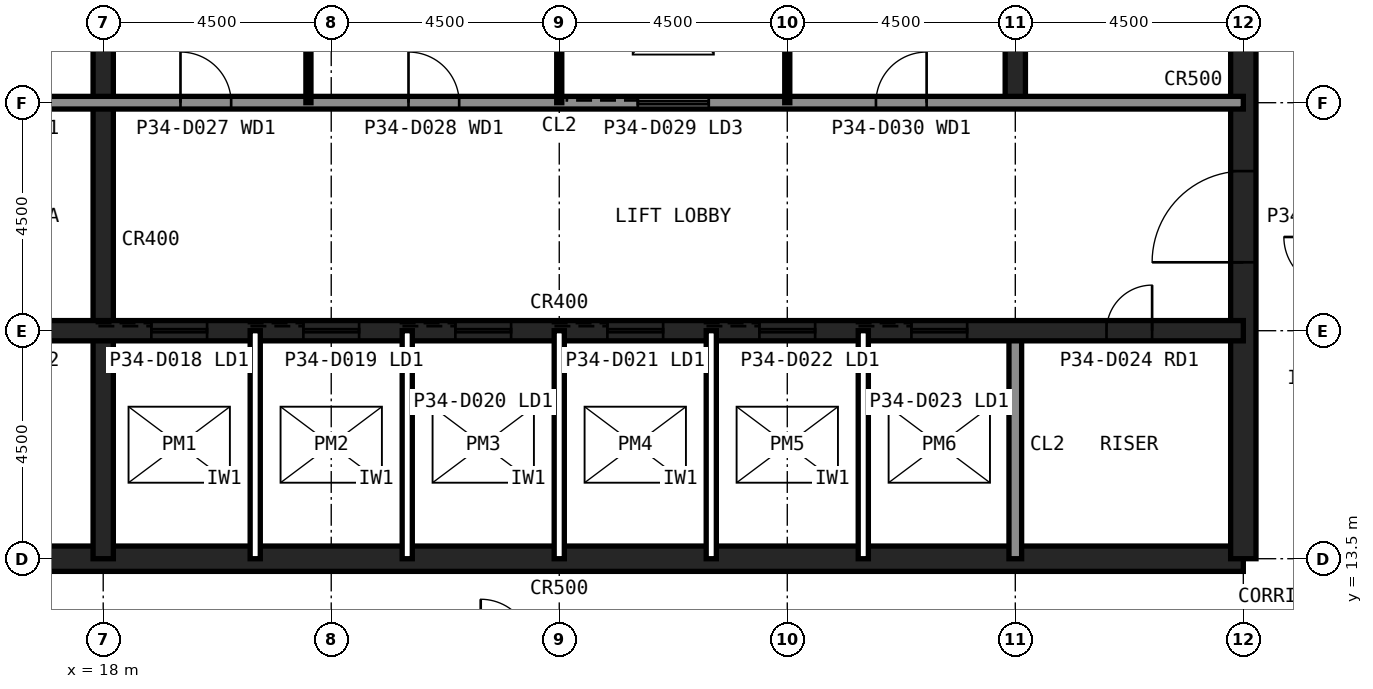
"""IFC4 building model, lengths in metres.
Left out: names, types, materials, properties, quantities, classifications, styles, units other than length and angle.
Written with IfcOpenShell. Run it as: python <this file> out.ifc"""

import sys

from ifc_helpers import new_model, si_unit, direction, frame, frame_2d, origin, place, context, subcontext, project, spatial, rectangle, extrude, element, fill, save


model = new_model("IFC4")
c1 = context("Model", 3, precision=1e-05, world=origin(), true_north=direction((0.0, 1.0)))
c2 = subcontext(c1, "Body", "Model", "MODEL_VIEW")
j1 = project(units=[si_unit("LENGTHUNIT", "METRE"), si_unit("PLANEANGLEUNIT", "RADIAN")], contexts=[c1])
p1 = place(None, origin())
s1 = spatial("IfcSite", under=j1, at=p1, CompositionType="ELEMENT")
p2 = place(p1, origin())
s2 = spatial("IfcBuilding", under=s1, at=p2, CompositionType="ELEMENT")
p3 = place(p2, frame((0.0, 0.0, 143.6)))
s3 = spatial("IfcBuildingStorey", under=s2, at=p3, CompositionType="ELEMENT", Elevation=143.6)
p4 = place(p3, frame((13.5, 13.5, 0.0), z_axis=(0.0, 0.0, 1.0), x_axis=(1.0, 0.0, 0.0)))
e1 = element("IfcWall", 1, at=p4, inside=s3, PredefinedType="SHEAR", context=c2, shape_type="SweptSolid", body=[
    extrude(rectangle(XDim=27.0, YDim=0.5, at=frame_2d((13.5, 0.0))), origin(), (0.0, 0.0, 1.0), 4.0),
])
p5 = place(p3, frame((40.5, 13.5, 0.0), z_axis=(0.0, 0.0, 1.0), x_axis=(0.0, 1.0, 0.0)))
e2 = element("IfcWall", 2, at=p5, inside=s3, PredefinedType="SHEAR", context=c2, shape_type="SweptSolid", body=[
    extrude(rectangle(XDim=27.0, YDim=0.5, at=frame_2d((13.5, 0.0))), origin(), (0.0, 0.0, 1.0), 4.0),
])
p6 = place(p5, frame((5.85, 0.0, 0.0)))
e3 = element("IfcOpeningElement", 3, at=p6, cuts=e2, PredefinedType="OPENING", context=c2, shape_type="SweptSolid", body=[
    extrude(rectangle(XDim=1.8, YDim=2.1, at=frame_2d((0.9, 1.05))), frame((0.0, 0.26, 0.0), z_axis=(0.0, -1.0, 0.0), x_axis=(1.0, 0.0, 0.0)), (0.0, 0.0, 1.0), 0.52),
])
p7 = place(p5, frame((19.65, 0.0, 0.0)))
e4 = element("IfcOpeningElement", 4, at=p7, cuts=e2, PredefinedType="OPENING", context=c2, shape_type="SweptSolid", body=[
    extrude(rectangle(XDim=1.2, YDim=2.1, at=frame_2d((0.6, 1.05))), frame((0.0, 0.26, 0.0), z_axis=(0.0, -1.0, 0.0), x_axis=(1.0, 0.0, 0.0)), (0.0, 0.0, 1.0), 0.52),
])
p8 = place(p3, frame((18.0, 13.5, 0.0), z_axis=(0.0, 0.0, 1.0), x_axis=(0.0, 1.0, 0.0)))
e5 = element("IfcWall", 5, at=p8, inside=s3, PredefinedType="SHEAR", context=c2, shape_type="SweptSolid", body=[
    extrude(rectangle(XDim=18.0, YDim=0.4, at=frame_2d((9.0, 0.0))), origin(), (0.0, 0.0, 1.0), 4.0),
])
p9 = place(p3, frame((36.0, 13.5, 0.0), z_axis=(0.0, 0.0, 1.0), x_axis=(0.0, 1.0, 0.0)))
e6 = element("IfcWall", 6, at=p9, inside=s3, PredefinedType="SOLIDWALL", context=c2, shape_type="SweptSolid", body=[
    extrude(rectangle(XDim=4.5, YDim=0.25, at=frame_2d((2.25, 0.0))), origin(), (0.0, 0.0, 1.0), 3.84),
])
p10 = place(p3, frame((36.0, 22.5, 0.0), z_axis=(0.0, 0.0, 1.0), x_axis=(0.0, 1.0, 0.0)))
e7 = element("IfcWall", 7, at=p10, inside=s3, PredefinedType="SHEAR", context=c2, shape_type="SweptSolid", body=[
    extrude(rectangle(XDim=18.0, YDim=0.4, at=frame_2d((9.0, 0.0))), origin(), (0.0, 0.0, 1.0), 4.0),
])
p11 = place(p3, frame((13.5, 18.0, 0.0), z_axis=(0.0, 0.0, 1.0), x_axis=(1.0, 0.0, 0.0)))
e8 = element("IfcWall", 8, at=p11, inside=s3, PredefinedType="SHEAR", context=c2, shape_type="SweptSolid", body=[
    extrude(rectangle(XDim=27.0, YDim=0.4, at=frame_2d((13.5, 0.0))), origin(), (0.0, 0.0, 1.0), 4.0),
])
p12 = place(p11, frame((24.3, 0.0, 0.0)))
e9 = element("IfcOpeningElement", 9, at=p12, cuts=e8, PredefinedType="OPENING", context=c2, shape_type="SweptSolid", body=[
    extrude(rectangle(XDim=0.9, YDim=2.1, at=frame_2d((0.45, 1.05))), frame((0.0, 0.21, 0.0), z_axis=(0.0, -1.0, 0.0), x_axis=(1.0, 0.0, 0.0)), (0.0, 0.0, 1.0), 0.42),
])
p13 = place(p11, frame((5.45, 0.0, 0.0)))
e10 = element("IfcOpeningElement", 10, at=p13, cuts=e8, PredefinedType="OPENING", context=c2, shape_type="SweptSolid", body=[
    extrude(rectangle(XDim=1.1, YDim=2.1, at=frame_2d((0.55, 1.05))), frame((0.0, 0.21, 0.0), z_axis=(0.0, -1.0, 0.0), x_axis=(1.0, 0.0, 0.0)), (0.0, 0.0, 1.0), 0.42),
])
p14 = place(p11, frame((8.45, 0.0, 0.0)))
e11 = element("IfcOpeningElement", 11, at=p14, cuts=e8, PredefinedType="OPENING", context=c2, shape_type="SweptSolid", body=[
    extrude(rectangle(XDim=1.1, YDim=2.1, at=frame_2d((0.55, 1.05))), frame((0.0, 0.21, 0.0), z_axis=(0.0, -1.0, 0.0), x_axis=(1.0, 0.0, 0.0)), (0.0, 0.0, 1.0), 0.42),
])
p15 = place(p11, frame((11.45, 0.0, 0.0)))
e12 = element("IfcOpeningElement", 12, at=p15, cuts=e8, PredefinedType="OPENING", context=c2, shape_type="SweptSolid", body=[
    extrude(rectangle(XDim=1.1, YDim=2.1, at=frame_2d((0.55, 1.05))), frame((0.0, 0.21, 0.0), z_axis=(0.0, -1.0, 0.0), x_axis=(1.0, 0.0, 0.0)), (0.0, 0.0, 1.0), 0.42),
])
p16 = place(p11, frame((14.45, 0.0, 0.0)))
e13 = element("IfcOpeningElement", 13, at=p16, cuts=e8, PredefinedType="OPENING", context=c2, shape_type="SweptSolid", body=[
    extrude(rectangle(XDim=1.1, YDim=2.1, at=frame_2d((0.55, 1.05))), frame((0.0, 0.21, 0.0), z_axis=(0.0, -1.0, 0.0), x_axis=(1.0, 0.0, 0.0)), (0.0, 0.0, 1.0), 0.42),
])
p17 = place(p11, frame((17.45, 0.0, 0.0)))
e14 = element("IfcOpeningElement", 14, at=p17, cuts=e8, PredefinedType="OPENING", context=c2, shape_type="SweptSolid", body=[
    extrude(rectangle(XDim=1.1, YDim=2.1, at=frame_2d((0.55, 1.05))), frame((0.0, 0.21, 0.0), z_axis=(0.0, -1.0, 0.0), x_axis=(1.0, 0.0, 0.0)), (0.0, 0.0, 1.0), 0.42),
])
p18 = place(p11, frame((20.45, 0.0, 0.0)))
e15 = element("IfcOpeningElement", 15, at=p18, cuts=e8, PredefinedType="OPENING", context=c2, shape_type="SweptSolid", body=[
    extrude(rectangle(XDim=1.1, YDim=2.1, at=frame_2d((0.55, 1.05))), frame((0.0, 0.21, 0.0), z_axis=(0.0, -1.0, 0.0), x_axis=(1.0, 0.0, 0.0)), (0.0, 0.0, 1.0), 0.42),
])
p19 = place(p11, frame((1.6, 0.0, 0.0)))
e16 = element("IfcOpeningElement", 16, at=p19, cuts=e8, PredefinedType="OPENING", context=c2, shape_type="SweptSolid", body=[
    extrude(rectangle(XDim=1.3, YDim=2.2, at=frame_2d((0.65, 1.1))), frame((0.0, 0.21, 0.0), z_axis=(0.0, -1.0, 0.0), x_axis=(1.0, 0.0, 0.0)), (0.0, 0.0, 1.0), 0.42),
])
p20 = place(p3, frame((13.5, 22.5, 0.0), z_axis=(0.0, 0.0, 1.0), x_axis=(1.0, 0.0, 0.0)))
e17 = element("IfcWall", 17, at=p20, inside=s3, PredefinedType="SOLIDWALL", context=c2, shape_type="SweptSolid", body=[
    extrude(rectangle(XDim=27.0, YDim=0.25, at=frame_2d((13.5, 0.0))), origin(), (0.0, 0.0, 1.0), 3.84),
])
p21 = place(p20, frame((1.65, 0.0, 0.0)))
e18 = element("IfcOpeningElement", 18, at=p21, cuts=e17, PredefinedType="OPENING", context=c2, shape_type="SweptSolid", body=[
    extrude(rectangle(XDim=1.2, YDim=2.1, at=frame_2d((0.6, 1.05))), frame((0.0, 0.135, 0.0), z_axis=(0.0, -1.0, 0.0), x_axis=(1.0, 0.0, 0.0)), (0.0, 0.0, 1.0), 0.27),
])
p22 = place(p20, frame((6.025, 0.0, 0.0)))
e19 = element("IfcOpeningElement", 19, at=p22, cuts=e17, PredefinedType="OPENING", context=c2, shape_type="SweptSolid", body=[
    extrude(rectangle(XDim=1.0, YDim=2.1, at=frame_2d((0.5, 1.05))), frame((0.0, 0.135, 0.0), z_axis=(0.0, -1.0, 0.0), x_axis=(1.0, 0.0, 0.0)), (0.0, 0.0, 1.0), 0.27),
])
p23 = place(p20, frame((10.525, 0.0, 0.0)))
e20 = element("IfcOpeningElement", 20, at=p23, cuts=e17, PredefinedType="OPENING", context=c2, shape_type="SweptSolid", body=[
    extrude(rectangle(XDim=1.0, YDim=2.1, at=frame_2d((0.5, 1.05))), frame((0.0, 0.135, 0.0), z_axis=(0.0, -1.0, 0.0), x_axis=(1.0, 0.0, 0.0)), (0.0, 0.0, 1.0), 0.27),
])
p24 = place(p20, frame((19.75, 0.0, 0.0)))
e21 = element("IfcOpeningElement", 21, at=p24, cuts=e17, PredefinedType="OPENING", context=c2, shape_type="SweptSolid", body=[
    extrude(rectangle(XDim=1.0, YDim=2.1, at=frame_2d((0.5, 1.05))), frame((0.0, 0.135, 0.0), z_axis=(0.0, -1.0, 0.0), x_axis=(1.0, 0.0, 0.0)), (0.0, 0.0, 1.0), 0.27),
])
p25 = place(p20, frame((15.05, 0.0, 0.0)))
e22 = element("IfcOpeningElement", 22, at=p25, cuts=e17, PredefinedType="OPENING", context=c2, shape_type="SweptSolid", body=[
    extrude(rectangle(XDim=1.4, YDim=2.4, at=frame_2d((0.7, 1.2))), frame((0.0, 0.135, 0.0), z_axis=(0.0, -1.0, 0.0), x_axis=(1.0, 0.0, 0.0)), (0.0, 0.0, 1.0), 0.27),
])
for number, where, z_axis, x_axis in (
    (23, (21.0, 13.5, 0.0), (0.0, 0.0, 1.0), (0.0, 1.0, 0.0)),
    (24, (24.0, 13.5, 0.0), (0.0, 0.0, 1.0), (0.0, 1.0, 0.0)),
    (25, (27.0, 13.5, 0.0), (0.0, 0.0, 1.0), (0.0, 1.0, 0.0)),
    (26, (30.0, 13.5, 0.0), (0.0, 0.0, 1.0), (0.0, 1.0, 0.0)),
    (27, (33.0, 13.5, 0.0), (0.0, 0.0, 1.0), (0.0, 1.0, 0.0)),
):
    element("IfcWall", number, at=place(p3, frame(where, z_axis=z_axis, x_axis=x_axis)), inside=s3, PredefinedType="PARTITIONING", context=c2, shape_type="SweptSolid", body=[
        extrude(rectangle(XDim=4.5, YDim=0.2, at=frame_2d((2.25, 0.0))), origin(), (0.0, 0.0, 1.0), 3.84),
    ])
for number, where, z_axis, x_axis in (
    (28, (22.05, 22.5, 0.0), (0.0, 0.0, 1.0), (0.0, 1.0, 0.0)),
    (29, (27.0, 22.5, 0.0), (0.0, 0.0, 1.0), (0.0, 1.0, 0.0)),
    (30, (31.5, 22.5, 0.0), (0.0, 0.0, 1.0), (0.0, 1.0, 0.0)),
):
    element("IfcWall", number, at=place(p3, frame(where, z_axis=z_axis, x_axis=x_axis)), inside=s3, PredefinedType="PLUMBINGWALL", context=c2, shape_type="SweptSolid", body=[
        extrude(rectangle(XDim=9.0, YDim=0.1, at=frame_2d((4.5, 0.0))), origin(), (0.0, 0.0, 1.0), 3.84),
    ])
p26 = place(p6, origin())
e31 = element("IfcDoor", 31, at=p26, inside=s3, OperationType="SINGLE_SWING_LEFT", PredefinedType="DOOR", context=c2, shape_type="SweptSolid", body=[
    extrude(rectangle(XDim=1.8, YDim=2.1, at=frame_2d((0.9, 1.05))), frame((0.0, 0.025, 0.0), z_axis=(0.0, -1.0, 0.0), x_axis=(1.0, 0.0, 0.0)), (0.0, 0.0, 1.0), 0.05),
])
fill(e3, e31)
p27 = place(p22, origin())
e32 = element("IfcDoor", 32, at=p27, inside=s3, OperationType="SINGLE_SWING_LEFT", PredefinedType="DOOR", context=c2, shape_type="SweptSolid", body=[
    extrude(rectangle(XDim=1.0, YDim=2.1, at=frame_2d((0.5, 1.05))), frame((0.0, 0.025, 0.0), z_axis=(0.0, -1.0, 0.0), x_axis=(1.0, 0.0, 0.0)), (0.0, 0.0, 1.0), 0.05),
])
fill(e19, e32)
p28 = place(p23, origin())
e33 = element("IfcDoor", 33, at=p28, inside=s3, OperationType="SINGLE_SWING_LEFT", PredefinedType="DOOR", context=c2, shape_type="SweptSolid", body=[
    extrude(rectangle(XDim=1.0, YDim=2.1, at=frame_2d((0.5, 1.05))), frame((0.0, 0.025, 0.0), z_axis=(0.0, -1.0, 0.0), x_axis=(1.0, 0.0, 0.0)), (0.0, 0.0, 1.0), 0.05),
])
fill(e20, e33)
p29 = place(p24, origin())
e34 = element("IfcDoor", 34, at=p29, inside=s3, OperationType="SINGLE_SWING_RIGHT", PredefinedType="DOOR", context=c2, shape_type="SweptSolid", body=[
    extrude(rectangle(XDim=1.0, YDim=2.1, at=frame_2d((0.5, 1.05))), frame((0.0, 0.025, 0.0), z_axis=(0.0, -1.0, 0.0), x_axis=(1.0, 0.0, 0.0)), (0.0, 0.0, 1.0), 0.05),
])
fill(e21, e34)
p30 = place(p12, origin())
e35 = element("IfcDoor", 35, at=p30, inside=s3, OperationType="SINGLE_SWING_RIGHT", PredefinedType="DOOR", context=c2, shape_type="SweptSolid", body=[
    extrude(rectangle(XDim=0.9, YDim=2.1, at=frame_2d((0.45, 1.05))), frame((0.0, 0.025, 0.0), z_axis=(0.0, -1.0, 0.0), x_axis=(1.0, 0.0, 0.0)), (0.0, 0.0, 1.0), 0.05),
])
fill(e9, e35)
p31 = place(p13, origin())
e36 = element("IfcDoor", 36, at=p31, inside=s3, OperationType="SLIDING_TO_LEFT", PredefinedType="DOOR", context=c2, shape_type="SweptSolid", body=[
    extrude(rectangle(XDim=1.1, YDim=2.1, at=frame_2d((0.55, 1.05))), frame((0.0, 0.025, 0.0), z_axis=(0.0, -1.0, 0.0), x_axis=(1.0, 0.0, 0.0)), (0.0, 0.0, 1.0), 0.05),
])
fill(e10, e36)
p32 = place(p14, origin())
e37 = element("IfcDoor", 37, at=p32, inside=s3, OperationType="SLIDING_TO_LEFT", PredefinedType="DOOR", context=c2, shape_type="SweptSolid", body=[
    extrude(rectangle(XDim=1.1, YDim=2.1, at=frame_2d((0.55, 1.05))), frame((0.0, 0.025, 0.0), z_axis=(0.0, -1.0, 0.0), x_axis=(1.0, 0.0, 0.0)), (0.0, 0.0, 1.0), 0.05),
])
fill(e11, e37)
p33 = place(p15, origin())
e38 = element("IfcDoor", 38, at=p33, inside=s3, OperationType="SLIDING_TO_LEFT", PredefinedType="DOOR", context=c2, shape_type="SweptSolid", body=[
    extrude(rectangle(XDim=1.1, YDim=2.1, at=frame_2d((0.55, 1.05))), frame((0.0, 0.025, 0.0), z_axis=(0.0, -1.0, 0.0), x_axis=(1.0, 0.0, 0.0)), (0.0, 0.0, 1.0), 0.05),
])
fill(e12, e38)
p34 = place(p16, origin())
e39 = element("IfcDoor", 39, at=p34, inside=s3, OperationType="SLIDING_TO_LEFT", PredefinedType="DOOR", context=c2, shape_type="SweptSolid", body=[
    extrude(rectangle(XDim=1.1, YDim=2.1, at=frame_2d((0.55, 1.05))), frame((0.0, 0.025, 0.0), z_axis=(0.0, -1.0, 0.0), x_axis=(1.0, 0.0, 0.0)), (0.0, 0.0, 1.0), 0.05),
])
fill(e13, e39)
p35 = place(p17, origin())
e40 = element("IfcDoor", 40, at=p35, inside=s3, OperationType="SLIDING_TO_LEFT", PredefinedType="DOOR", context=c2, shape_type="SweptSolid", body=[
    extrude(rectangle(XDim=1.1, YDim=2.1, at=frame_2d((0.55, 1.05))), frame((0.0, 0.025, 0.0), z_axis=(0.0, -1.0, 0.0), x_axis=(1.0, 0.0, 0.0)), (0.0, 0.0, 1.0), 0.05),
])
fill(e14, e40)
p36 = place(p18, origin())
e41 = element("IfcDoor", 41, at=p36, inside=s3, OperationType="SLIDING_TO_LEFT", PredefinedType="DOOR", context=c2, shape_type="SweptSolid", body=[
    extrude(rectangle(XDim=1.1, YDim=2.1, at=frame_2d((0.55, 1.05))), frame((0.0, 0.025, 0.0), z_axis=(0.0, -1.0, 0.0), x_axis=(1.0, 0.0, 0.0)), (0.0, 0.0, 1.0), 0.05),
])
fill(e15, e41)
p37 = place(p25, origin())
e42 = element("IfcDoor", 42, at=p37, inside=s3, OperationType="SLIDING_TO_LEFT", PredefinedType="DOOR", context=c2, shape_type="SweptSolid", body=[
    extrude(rectangle(XDim=1.4, YDim=2.4, at=frame_2d((0.7, 1.2))), frame((0.0, 0.025, 0.0), z_axis=(0.0, -1.0, 0.0), x_axis=(1.0, 0.0, 0.0)), (0.0, 0.0, 1.0), 0.05),
])
fill(e22, e42)
save(model, sys.argv[1])
